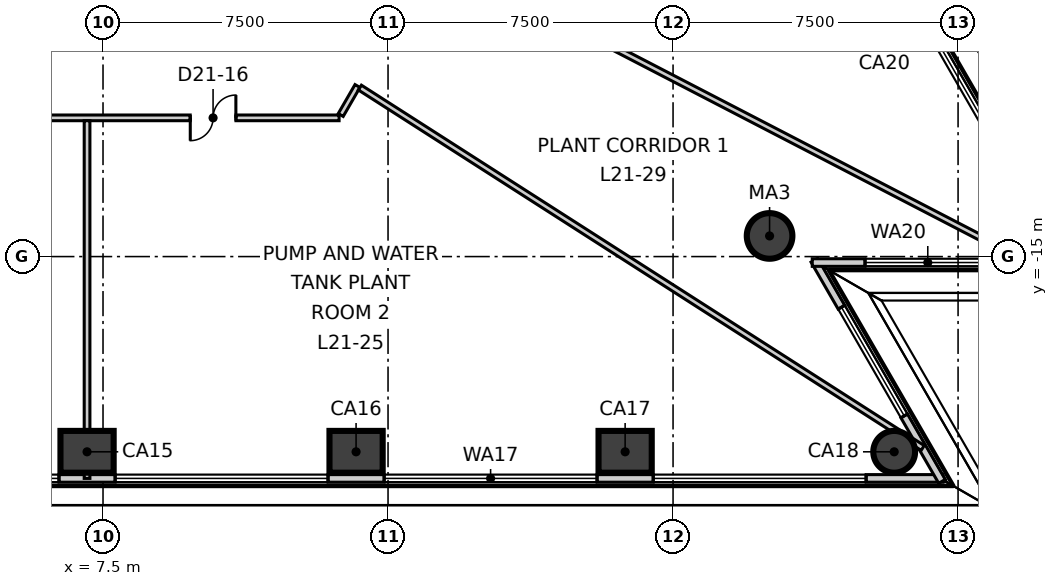
"""IFC4 building model, lengths in metres.
Left out: names, types, materials, properties, quantities, classifications, styles, units other than length and angle.
Written with IfcOpenShell. Run it as: python <this file> out.ifc"""

import sys

from ifc_helpers import new_model, si_unit, direction, frame, frame_2d, origin, origin_2d, place, context, subcontext, project, spatial, rectangle, circle, extrude, element, fill, save


model = new_model("IFC4")
c1 = context("Model", 3, precision=1e-05, world=origin(), true_north=direction((0.0, 1.0)))
c2 = subcontext(c1, "Body", "Model", "MODEL_VIEW")
j1 = project(units=[si_unit("LENGTHUNIT", "METRE"), si_unit("PLANEANGLEUNIT", "RADIAN")], contexts=[c1])
p1 = place(None, origin())
s1 = spatial("IfcSite", under=j1, at=p1, CompositionType="ELEMENT")
p2 = place(p1, origin())
s2 = spatial("IfcBuilding", under=s1, at=p2, CompositionType="ELEMENT")
p3 = place(p2, frame((0.0, 0.0, 95.3)))
s3 = spatial("IfcBuildingStorey", under=s2, at=p3, CompositionType="ELEMENT", Elevation=95.3)
for number, where, z_axis, x_axis in (
    (1, (7.08, -20.137, -0.3), (0.0, 0.0, 1.0), (1.0, 0.0, 0.0)),
    (2, (14.159, -20.137, -0.3), (0.0, 0.0, 1.0), (1.0, 0.0, 0.0)),
    (3, (21.239, -20.137, -0.3), (0.0, 0.0, 1.0), (1.0, 0.0, 0.0)),
):
    element("IfcColumn", number, at=place(p3, frame(where, z_axis=z_axis, x_axis=x_axis)), inside=s3, PredefinedType="COLUMN", context=c2, shape_type="SweptSolid", body=[
        extrude(rectangle(XDim=1.4, YDim=1.1, at=origin_2d()), origin(), (0.0, 0.0, 1.0), 4.2),
    ])
p4 = place(p3, frame((28.319, -20.137, -0.3), z_axis=(0.0, 0.0, 1.0), x_axis=(1.0, 0.0, 0.0)))
e4 = element("IfcColumn", 4, at=p4, inside=s3, PredefinedType="COLUMN", context=c2, shape_type="SweptSolid", body=[
    extrude(circle(Radius=0.55, at=origin_2d()), origin(), (0.0, 0.0, 1.0), 4.2),
])
p5 = place(p3, frame((25.04, -14.457, -0.3), z_axis=(0.0, 0.0, 1.0), x_axis=(1.0, 0.0, 0.0)))
e5 = element("IfcColumn", 5, at=p5, inside=s3, PredefinedType="COLUMN", context=c2, shape_type="SweptSolid", body=[
    extrude(circle(Radius=0.6, at=origin_2d()), origin(), (0.0, 0.0, 1.0), 4.2),
])
p6 = place(p3, frame((-29.622, -20.837, 0.0), z_axis=(0.0, 0.0, 1.0), x_axis=(1.0, 0.0, 0.0)))
e6 = element("IfcWall", 6, at=p6, inside=s3, PredefinedType="ELEMENTEDWALL", context=c2, shape_type="SweptSolid", body=[
    extrude(rectangle(XDim=59.224, YDim=0.2, at=frame_2d((29.612, 0.0))), origin(), (0.0, 0.0, 1.0), 3.9),
])
p7 = place(p6, frame((2.043, 0.0, 0.9)))
e7 = element("IfcOpeningElement", 7, at=p7, cuts=e6, PredefinedType="OPENING", context=c2, shape_type="SweptSolid", body=[
    extrude(rectangle(XDim=5.6, YDim=2.5, at=frame_2d((2.8, 1.25))), frame((0.0, 0.11, 0.0), z_axis=(0.0, -1.0, 0.0), x_axis=(1.0, 0.0, 0.0)), (0.0, 0.0, 1.0), 0.22),
])
p8 = place(p6, frame((9.123, 0.0, 0.9)))
e8 = element("IfcOpeningElement", 8, at=p8, cuts=e6, PredefinedType="OPENING", context=c2, shape_type="SweptSolid", body=[
    extrude(rectangle(XDim=5.6, YDim=2.5, at=frame_2d((2.8, 1.25))), frame((0.0, 0.11, 0.0), z_axis=(0.0, -1.0, 0.0), x_axis=(1.0, 0.0, 0.0)), (0.0, 0.0, 1.0), 0.22),
])
p9 = place(p6, frame((16.202, 0.0, 0.9)))
e9 = element("IfcOpeningElement", 9, at=p9, cuts=e6, PredefinedType="OPENING", context=c2, shape_type="SweptSolid", body=[
    extrude(rectangle(XDim=5.6, YDim=2.5, at=frame_2d((2.8, 1.25))), frame((0.0, 0.11, 0.0), z_axis=(0.0, -1.0, 0.0), x_axis=(1.0, 0.0, 0.0)), (0.0, 0.0, 1.0), 0.22),
])
p10 = place(p6, frame((23.282, 0.0, 0.9)))
e10 = element("IfcOpeningElement", 10, at=p10, cuts=e6, PredefinedType="OPENING", context=c2, shape_type="SweptSolid", body=[
    extrude(rectangle(XDim=5.6, YDim=2.5, at=frame_2d((2.8, 1.25))), frame((0.0, 0.11, 0.0), z_axis=(0.0, -1.0, 0.0), x_axis=(1.0, 0.0, 0.0)), (0.0, 0.0, 1.0), 0.22),
])
p11 = place(p6, frame((30.362, 0.0, 0.9)))
e11 = element("IfcOpeningElement", 11, at=p11, cuts=e6, PredefinedType="OPENING", context=c2, shape_type="SweptSolid", body=[
    extrude(rectangle(XDim=5.6, YDim=2.5, at=frame_2d((2.8, 1.25))), frame((0.0, 0.11, 0.0), z_axis=(0.0, -1.0, 0.0), x_axis=(1.0, 0.0, 0.0)), (0.0, 0.0, 1.0), 0.22),
])
p12 = place(p6, frame((37.442, 0.0, 0.9)))
e12 = element("IfcOpeningElement", 12, at=p12, cuts=e6, PredefinedType="OPENING", context=c2, shape_type="SweptSolid", body=[
    extrude(rectangle(XDim=5.6, YDim=2.5, at=frame_2d((2.8, 1.25))), frame((0.0, 0.11, 0.0), z_axis=(0.0, -1.0, 0.0), x_axis=(1.0, 0.0, 0.0)), (0.0, 0.0, 1.0), 0.22),
])
p13 = place(p6, frame((44.521, 0.0, 0.9)))
e13 = element("IfcOpeningElement", 13, at=p13, cuts=e6, PredefinedType="OPENING", context=c2, shape_type="SweptSolid", body=[
    extrude(rectangle(XDim=5.6, YDim=2.5, at=frame_2d((2.8, 1.25))), frame((0.0, 0.11, 0.0), z_axis=(0.0, -1.0, 0.0), x_axis=(1.0, 0.0, 0.0)), (0.0, 0.0, 1.0), 0.22),
])
p14 = place(p6, frame((51.601, 0.0, 0.9)))
e14 = element("IfcOpeningElement", 14, at=p14, cuts=e6, PredefinedType="OPENING", context=c2, shape_type="SweptSolid", body=[
    extrude(rectangle(XDim=5.6, YDim=2.5, at=frame_2d((2.8, 1.25))), frame((0.0, 0.11, 0.0), z_axis=(0.0, -1.0, 0.0), x_axis=(1.0, 0.0, 0.0)), (0.0, 0.0, 1.0), 0.22),
])
p15 = place(p3, frame((29.577, -20.915, 0.0), z_axis=(0.0, 0.0, 1.0), x_axis=(-0.499914325741, 0.866074862191, 0.0)))
e15 = element("IfcWall", 15, at=p15, inside=s3, PredefinedType="ELEMENTEDWALL", context=c2, shape_type="SweptSolid", body=[
    extrude(rectangle(XDim=6.719, YDim=0.2, at=frame_2d((3.359, 0.0))), origin(), (0.0, 0.0, 1.0), 3.9),
])
p16 = place(p15, frame((1.99, 0.0, 0.9)))
e16 = element("IfcOpeningElement", 16, at=p16, cuts=e15, PredefinedType="OPENING", context=c2, shape_type="SweptSolid", body=[
    extrude(rectangle(XDim=3.3, YDim=2.5, at=frame_2d((1.65, 1.25))), frame((0.0, 0.11, 0.0), z_axis=(0.0, -1.0, 0.0), x_axis=(1.0, 0.0, 0.0)), (0.0, 0.0, 1.0), 0.22),
])
p17 = place(p3, frame((26.163, -15.157, 0.0), z_axis=(0.0, 0.0, 1.0), x_axis=(1.0, 0.0, 0.0)))
e17 = element("IfcWall", 17, at=p17, inside=s3, PredefinedType="ELEMENTEDWALL", context=c2, shape_type="SweptSolid", body=[
    extrude(rectangle(XDim=6.719, YDim=0.2, at=frame_2d((3.359, 0.0))), origin(), (0.0, 0.0, 1.0), 3.9),
])
p18 = place(p17, frame((1.39, 0.0, 0.9)))
e18 = element("IfcOpeningElement", 18, at=p18, cuts=e17, PredefinedType="OPENING", context=c2, shape_type="SweptSolid", body=[
    extrude(rectangle(XDim=3.3, YDim=2.5, at=frame_2d((1.65, 1.25))), frame((0.0, 0.11, 0.0), z_axis=(0.0, -1.0, 0.0), x_axis=(1.0, 0.0, 0.0)), (0.0, 0.0, 1.0), 0.22),
])
p19 = place(p3, frame((32.857, -15.235, 0.0), z_axis=(0.0, 0.0, 1.0), x_axis=(-0.500009108245, 0.866020145073, 0.0)))
e19 = element("IfcWall", 19, at=p19, inside=s3, PredefinedType="ELEMENTEDWALL", context=c2, shape_type="SweptSolid", body=[
    extrude(rectangle(XDim=59.225, YDim=0.2, at=frame_2d((29.613, 0.0))), origin(), (0.0, 0.0, 1.0), 3.9),
])
p20 = place(p19, frame((2.043, 0.0, 0.9)))
e20 = element("IfcOpeningElement", 20, at=p20, cuts=e19, PredefinedType="OPENING", context=c2, shape_type="SweptSolid", body=[
    extrude(rectangle(XDim=5.6, YDim=2.5, at=frame_2d((2.8, 1.25))), frame((0.0, 0.11, 0.0), z_axis=(0.0, -1.0, 0.0), x_axis=(1.0, 0.0, 0.0)), (0.0, 0.0, 1.0), 0.22),
])
p21 = place(p19, frame((9.123, 0.0, 0.9)))
e21 = element("IfcOpeningElement", 21, at=p21, cuts=e19, PredefinedType="OPENING", context=c2, shape_type="SweptSolid", body=[
    extrude(rectangle(XDim=5.6, YDim=2.5, at=frame_2d((2.8, 1.25))), frame((0.0, 0.11, 0.0), z_axis=(0.0, -1.0, 0.0), x_axis=(1.0, 0.0, 0.0)), (0.0, 0.0, 1.0), 0.22),
])
p22 = place(p19, frame((16.203, 0.0, 0.9)))
e22 = element("IfcOpeningElement", 22, at=p22, cuts=e19, PredefinedType="OPENING", context=c2, shape_type="SweptSolid", body=[
    extrude(rectangle(XDim=5.6, YDim=2.5, at=frame_2d((2.8, 1.25))), frame((0.0, 0.11, 0.0), z_axis=(0.0, -1.0, 0.0), x_axis=(1.0, 0.0, 0.0)), (0.0, 0.0, 1.0), 0.22),
])
p23 = place(p19, frame((23.282, 0.0, 0.9)))
e23 = element("IfcOpeningElement", 23, at=p23, cuts=e19, PredefinedType="OPENING", context=c2, shape_type="SweptSolid", body=[
    extrude(rectangle(XDim=5.6, YDim=2.5, at=frame_2d((2.8, 1.25))), frame((0.0, 0.11, 0.0), z_axis=(0.0, -1.0, 0.0), x_axis=(1.0, 0.0, 0.0)), (0.0, 0.0, 1.0), 0.22),
])
p24 = place(p19, frame((30.362, 0.0, 0.9)))
e24 = element("IfcOpeningElement", 24, at=p24, cuts=e19, PredefinedType="OPENING", context=c2, shape_type="SweptSolid", body=[
    extrude(rectangle(XDim=5.6, YDim=2.5, at=frame_2d((2.8, 1.25))), frame((0.0, 0.11, 0.0), z_axis=(0.0, -1.0, 0.0), x_axis=(1.0, 0.0, 0.0)), (0.0, 0.0, 1.0), 0.22),
])
p25 = place(p19, frame((37.442, 0.0, 0.9)))
e25 = element("IfcOpeningElement", 25, at=p25, cuts=e19, PredefinedType="OPENING", context=c2, shape_type="SweptSolid", body=[
    extrude(rectangle(XDim=5.6, YDim=2.5, at=frame_2d((2.8, 1.25))), frame((0.0, 0.11, 0.0), z_axis=(0.0, -1.0, 0.0), x_axis=(1.0, 0.0, 0.0)), (0.0, 0.0, 1.0), 0.22),
])
p26 = place(p19, frame((44.522, 0.0, 0.9)))
e26 = element("IfcOpeningElement", 26, at=p26, cuts=e19, PredefinedType="OPENING", context=c2, shape_type="SweptSolid", body=[
    extrude(rectangle(XDim=5.6, YDim=2.5, at=frame_2d((2.8, 1.25))), frame((0.0, 0.11, 0.0), z_axis=(0.0, -1.0, 0.0), x_axis=(1.0, 0.0, 0.0)), (0.0, 0.0, 1.0), 0.22),
])
p27 = place(p19, frame((51.602, 0.0, 0.9)))
e27 = element("IfcOpeningElement", 27, at=p27, cuts=e19, PredefinedType="OPENING", context=c2, shape_type="SweptSolid", body=[
    extrude(rectangle(XDim=5.6, YDim=2.5, at=frame_2d((2.8, 1.25))), frame((0.0, 0.11, 0.0), z_axis=(0.0, -1.0, 0.0), x_axis=(1.0, 0.0, 0.0)), (0.0, 0.0, 1.0), 0.22),
])
p28 = place(p3, frame((-13.625, -11.35, 0.0), z_axis=(0.0, 0.0, 1.0), x_axis=(1.0, 0.0, 0.0)))
e28 = element("IfcWall", 28, at=p28, inside=s3, PredefinedType="PARTITIONING", context=c2, shape_type="SweptSolid", body=[
    extrude(rectangle(XDim=27.337, YDim=0.15, at=frame_2d((13.668, 0.0))), origin(), (0.0, 0.0, 1.0), 3.9),
])
p29 = place(p28, frame((2.629, 0.0, 0.0)))
e29 = element("IfcOpeningElement", 29, at=p29, cuts=e28, PredefinedType="OPENING", context=c2, shape_type="SweptSolid", body=[
    extrude(rectangle(XDim=1.2, YDim=2.1, at=frame_2d((0.6, 1.05))), frame((0.0, 0.085, 0.0), z_axis=(0.0, -1.0, 0.0), x_axis=(1.0, 0.0, 0.0)), (0.0, 0.0, 1.0), 0.17),
])
p30 = place(p28, frame((13.025, 0.0, 0.0)))
e30 = element("IfcOpeningElement", 30, at=p30, cuts=e28, PredefinedType="OPENING", context=c2, shape_type="SweptSolid", body=[
    extrude(rectangle(XDim=1.2, YDim=2.1, at=frame_2d((0.6, 1.05))), frame((0.0, 0.085, 0.0), z_axis=(0.0, -1.0, 0.0), x_axis=(1.0, 0.0, 0.0)), (0.0, 0.0, 1.0), 0.17),
])
p31 = place(p28, frame((23.421, 0.0, 0.0)))
e31 = element("IfcOpeningElement", 31, at=p31, cuts=e28, PredefinedType="OPENING", context=c2, shape_type="SweptSolid", body=[
    extrude(rectangle(XDim=1.2, YDim=2.1, at=frame_2d((0.6, 1.05))), frame((0.0, 0.085, 0.0), z_axis=(0.0, -1.0, 0.0), x_axis=(1.0, 0.0, 0.0)), (0.0, 0.0, 1.0), 0.17),
])
p32 = place(p3, frame((7.08, -20.837, 0.0), z_axis=(0.0, 0.0, 1.0), x_axis=(0.0, 1.0, 0.0)))
e32 = element("IfcWall", 32, at=p32, inside=s3, PredefinedType="PARTITIONING", context=c2, shape_type="SweptSolid", body=[
    extrude(rectangle(XDim=9.412, YDim=0.15, at=frame_2d((4.706, 0.0))), origin(), (0.0, 0.0, 1.0), 3.9),
])
p33 = place(p3, frame((13.755, -11.275, 0.0), z_axis=(0.0, 0.0, 1.0), x_axis=(0.500577563191, 0.865691690632, 0.0)))
e33 = element("IfcWall", 33, at=p33, inside=s3, PredefinedType="PARTITIONING", context=c2, shape_type="SweptSolid", body=[
    extrude(rectangle(XDim=0.881, YDim=0.15, at=frame_2d((0.441, 0.0))), origin(), (0.0, 0.0, 1.0), 3.9),
])
p34 = place(p3, frame((14.259, -10.553, 0.0), z_axis=(0.0, 0.0, 1.0), x_axis=(0.842155907039, -0.539234112644, 0.0)))
e34 = element("IfcWall", 34, at=p34, inside=s3, PredefinedType="PARTITIONING", context=c2, shape_type="SweptSolid", body=[
    extrude(rectangle(XDim=17.586, YDim=0.15, at=frame_2d((8.793, 0.0))), origin(), (0.0, 0.0, 1.0), 3.1),
])
p35 = place(p3, frame((16.265, -7.078, 0.0), z_axis=(0.0, 0.0, 1.0), x_axis=(0.887886216107, -0.460063112243, 0.0)))
e35 = element("IfcWall", 35, at=p35, inside=s3, PredefinedType="PARTITIONING", context=c2, shape_type="SweptSolid", body=[
    extrude(rectangle(XDim=17.561, YDim=0.15, at=frame_2d((8.78, 0.0))), origin(), (0.0, 0.0, 1.0), 3.1),
])
p36 = place(p11, origin())
e36 = element("IfcWindow", 36, at=p36, inside=s3, PartitioningType="SINGLE_PANEL", PredefinedType="WINDOW", context=c2, shape_type="SweptSolid", body=[
    extrude(rectangle(XDim=5.6, YDim=2.5, at=frame_2d((2.8, 1.25))), frame((0.0, 0.03, 0.0), z_axis=(0.0, -1.0, 0.0), x_axis=(1.0, 0.0, 0.0)), (0.0, 0.0, 1.0), 0.06),
])
fill(e11, e36)
p37 = place(p12, origin())
e37 = element("IfcWindow", 37, at=p37, inside=s3, PartitioningType="SINGLE_PANEL", PredefinedType="WINDOW", context=c2, shape_type="SweptSolid", body=[
    extrude(rectangle(XDim=5.6, YDim=2.5, at=frame_2d((2.8, 1.25))), frame((0.0, 0.03, 0.0), z_axis=(0.0, -1.0, 0.0), x_axis=(1.0, 0.0, 0.0)), (0.0, 0.0, 1.0), 0.06),
])
fill(e12, e37)
p38 = place(p13, origin())
e38 = element("IfcWindow", 38, at=p38, inside=s3, PartitioningType="SINGLE_PANEL", PredefinedType="WINDOW", context=c2, shape_type="SweptSolid", body=[
    extrude(rectangle(XDim=5.6, YDim=2.5, at=frame_2d((2.8, 1.25))), frame((0.0, 0.03, 0.0), z_axis=(0.0, -1.0, 0.0), x_axis=(1.0, 0.0, 0.0)), (0.0, 0.0, 1.0), 0.06),
])
fill(e13, e38)
p39 = place(p14, origin())
e39 = element("IfcWindow", 39, at=p39, inside=s3, PartitioningType="SINGLE_PANEL", PredefinedType="WINDOW", context=c2, shape_type="SweptSolid", body=[
    extrude(rectangle(XDim=5.6, YDim=2.5, at=frame_2d((2.8, 1.25))), frame((0.0, 0.03, 0.0), z_axis=(0.0, -1.0, 0.0), x_axis=(1.0, 0.0, 0.0)), (0.0, 0.0, 1.0), 0.06),
])
fill(e14, e39)
p40 = place(p16, origin())
e40 = element("IfcWindow", 40, at=p40, inside=s3, PartitioningType="SINGLE_PANEL", PredefinedType="WINDOW", context=c2, shape_type="SweptSolid", body=[
    extrude(rectangle(XDim=3.3, YDim=2.5, at=frame_2d((1.65, 1.25))), frame((0.0, 0.03, 0.0), z_axis=(0.0, -1.0, 0.0), x_axis=(1.0, 0.0, 0.0)), (0.0, 0.0, 1.0), 0.06),
])
fill(e16, e40)
p41 = place(p18, origin())
e41 = element("IfcWindow", 41, at=p41, inside=s3, PartitioningType="SINGLE_PANEL", PredefinedType="WINDOW", context=c2, shape_type="SweptSolid", body=[
    extrude(rectangle(XDim=3.3, YDim=2.5, at=frame_2d((1.65, 1.25))), frame((0.0, 0.03, 0.0), z_axis=(0.0, -1.0, 0.0), x_axis=(1.0, 0.0, 0.0)), (0.0, 0.0, 1.0), 0.06),
])
fill(e18, e41)
p42 = place(p20, origin())
e42 = element("IfcWindow", 42, at=p42, inside=s3, PartitioningType="SINGLE_PANEL", PredefinedType="WINDOW", context=c2, shape_type="SweptSolid", body=[
    extrude(rectangle(XDim=5.6, YDim=2.5, at=frame_2d((2.8, 1.25))), frame((0.0, 0.03, 0.0), z_axis=(0.0, -1.0, 0.0), x_axis=(1.0, 0.0, 0.0)), (0.0, 0.0, 1.0), 0.06),
])
fill(e20, e42)
p43 = place(p31, origin())
e43 = element("IfcDoor", 43, at=p43, inside=s3, OperationType="DOUBLE_DOOR_SINGLE_SWING", PredefinedType="DOOR", context=c2, shape_type="SweptSolid", body=[
    extrude(rectangle(XDim=1.2, YDim=2.1, at=frame_2d((0.6, 1.05))), frame((0.0, 0.025, 0.0), z_axis=(0.0, -1.0, 0.0), x_axis=(1.0, 0.0, 0.0)), (0.0, 0.0, 1.0), 0.05),
])
fill(e31, e43)
save(model, sys.argv[1])
